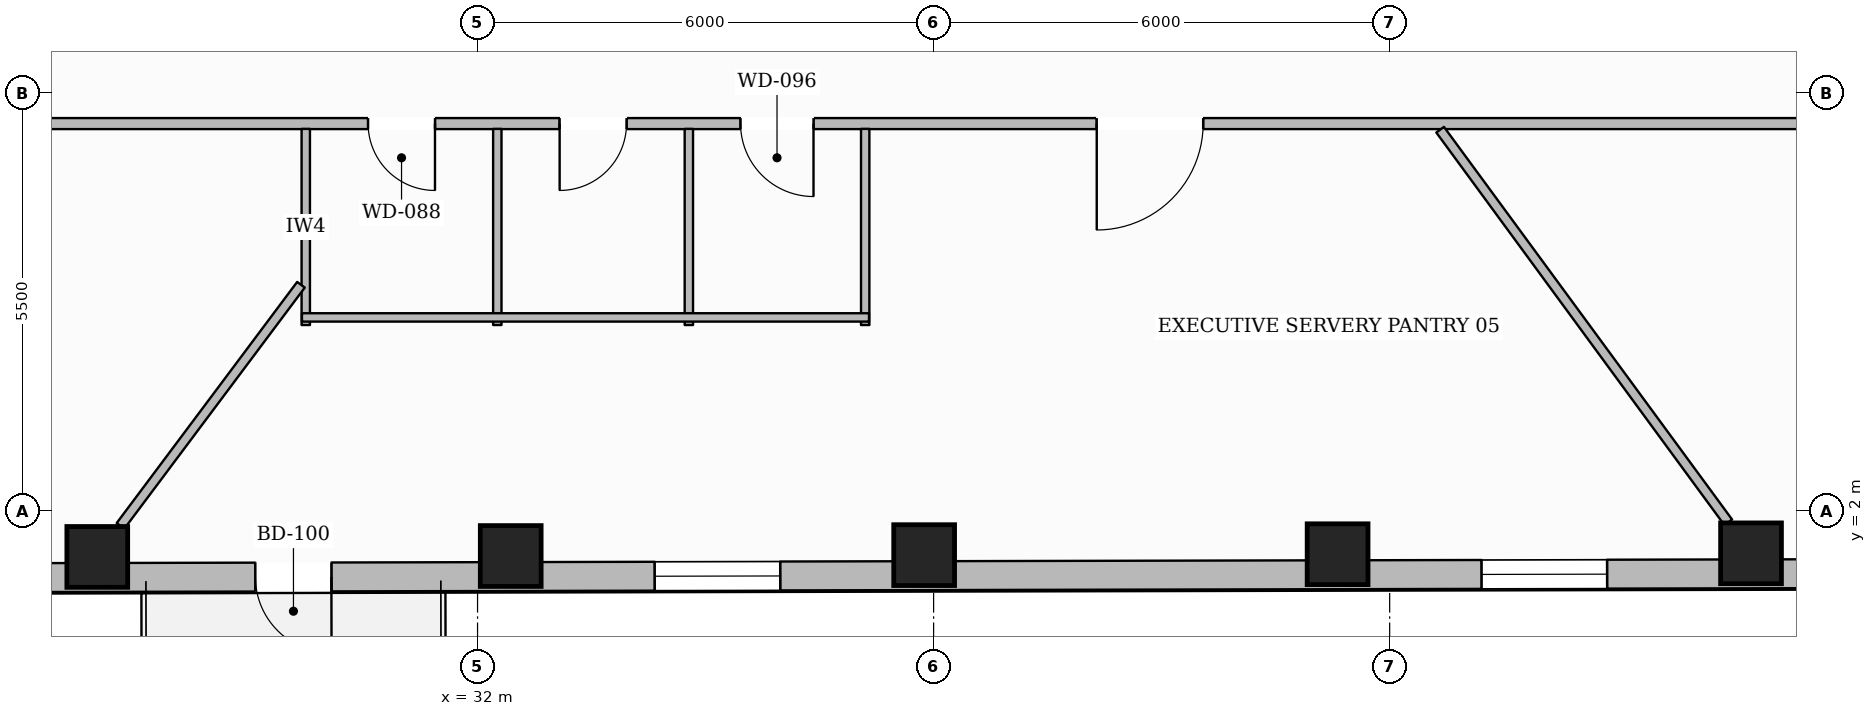
"""IFC4 building model, lengths in metres.
Left out: names, types, materials, properties, quantities, classifications, styles, units other than length and angle.
Written with IfcOpenShell. Run it as: python <this file> out.ifc"""

import sys

from ifc_helpers import new_model, si_unit, direction, frame, frame_2d, origin, origin_2d, place, context, subcontext, project, spatial, rectangle, hollow_rectangle, extrude, element, fill, save


model = new_model("IFC4")
c1 = context("Model", 3, precision=1e-05, world=origin(), true_north=direction((0.0, 1.0)))
c2 = subcontext(c1, "Body", "Model", "MODEL_VIEW")
j1 = project(units=[si_unit("LENGTHUNIT", "METRE"), si_unit("PLANEANGLEUNIT", "RADIAN")], contexts=[c1])
p1 = place(None, origin())
s1 = spatial("IfcSite", under=j1, at=p1, CompositionType="ELEMENT")
p2 = place(p1, origin())
s2 = spatial("IfcBuilding", under=s1, at=p2, CompositionType="ELEMENT")
p3 = place(p2, frame((0.0, 0.0, 17.55)))
s3 = spatial("IfcBuildingStorey", under=s2, at=p3, CompositionType="ELEMENT", Elevation=17.55)
for number, where, z_axis, x_axis in (
    (1, (26.997, 1.399, 0.0), (0.0, 0.0, 1.0), (1.0, 0.0, 0.0)),
    (2, (32.436, 1.411, 0.0), (0.0, 0.0, 1.0), (1.0, 0.0, 0.0)),
    (3, (37.875, 1.423, 0.0), (0.0, 0.0, 1.0), (1.0, 0.0, 0.0)),
    (4, (43.315, 1.435, 0.0), (0.0, 0.0, 1.0), (1.0, 0.0, 0.0)),
    (5, (48.754, 1.446, 0.0), (0.0, 0.0, 1.0), (1.0, 0.0, 0.0)),
):
    element("IfcColumn", number, at=place(p3, frame(where, z_axis=z_axis, x_axis=x_axis)), inside=s3, PredefinedType="COLUMN", context=c2, shape_type="SweptSolid", body=[
        extrude(hollow_rectangle(XDim=0.8, YDim=0.8, WallThickness=0.036, at=origin_2d()), origin(), (0.0, 0.0, 1.0), 3.59),
    ])
p4 = place(p3, frame((54.671, 1.189, 0.0), z_axis=(0.0, 0.0, 1.0), x_axis=(-0.999997638948, -0.002173038948, 0.0)))
e6 = element("IfcWall", 6, at=p4, inside=s3, PredefinedType="STANDARD", context=c2, shape_type="SweptSolid", body=[
    extrude(rectangle(XDim=33.593, YDim=0.38, at=frame_2d((16.796, 0.0))), origin(), (0.0, 0.0, 1.0), 2.97),
])
p5 = place(p4, frame((24.594, 0.0, 0.0)))
e7 = element("IfcOpeningElement", 7, at=p5, cuts=e6, PredefinedType="OPENING", context=c2, shape_type="SweptSolid", body=[
    extrude(rectangle(XDim=1.0, YDim=2.2, at=frame_2d((0.5, 1.1))), frame((0.0, 0.2, 0.0), z_axis=(0.0, -1.0, 0.0), x_axis=(1.0, 0.0, 0.0)), (0.0, 0.0, 1.0), 0.4),
])
p6 = place(p4, frame((29.569, 0.0, 0.65)))
e8 = element("IfcOpeningElement", 8, at=p6, cuts=e6, PredefinedType="OPENING", context=c2, shape_type="SweptSolid", body=[
    extrude(rectangle(XDim=1.65, YDim=1.75, at=frame_2d((0.825, 0.875))), frame((0.0, 0.2, 0.0), z_axis=(0.0, -1.0, 0.0), x_axis=(1.0, 0.0, 0.0)), (0.0, 0.0, 1.0), 0.4),
])
p7 = place(p4, frame((18.69, 0.0, 0.65)))
e9 = element("IfcOpeningElement", 9, at=p7, cuts=e6, PredefinedType="OPENING", context=c2, shape_type="SweptSolid", body=[
    extrude(rectangle(XDim=1.65, YDim=1.75, at=frame_2d((0.825, 0.875))), frame((0.0, 0.2, 0.0), z_axis=(0.0, -1.0, 0.0), x_axis=(1.0, 0.0, 0.0)), (0.0, 0.0, 1.0), 0.4),
])
p8 = place(p4, frame((7.811, 0.0, 0.65)))
e10 = element("IfcOpeningElement", 10, at=p8, cuts=e6, PredefinedType="OPENING", context=c2, shape_type="SweptSolid", body=[
    extrude(rectangle(XDim=1.65, YDim=1.75, at=frame_2d((0.825, 0.875))), frame((0.0, 0.2, 0.0), z_axis=(0.0, -1.0, 0.0), x_axis=(1.0, 0.0, 0.0)), (0.0, 0.0, 1.0), 0.4),
])
p9 = place(p4, frame((2.372, 0.0, 0.65)))
e11 = element("IfcOpeningElement", 11, at=p9, cuts=e6, PredefinedType="OPENING", context=c2, shape_type="SweptSolid", body=[
    extrude(rectangle(XDim=1.65, YDim=1.75, at=frame_2d((0.825, 0.875))), frame((0.0, 0.2, 0.0), z_axis=(0.0, -1.0, 0.0), x_axis=(1.0, 0.0, 0.0)), (0.0, 0.0, 1.0), 0.4),
])
p10 = place(p3, frame((49.92, 7.1, 0.0), z_axis=(0.0, 0.0, 1.0), x_axis=(-1.0, 0.0, 0.0)))
e12 = element("IfcWall", 12, at=p10, inside=s3, PredefinedType="PARTITIONING", context=c2, shape_type="SweptSolid", body=[
    extrude(rectangle(XDim=23.84, YDim=0.145, at=frame_2d((11.92, 0.0))), origin(), (0.0, 0.0, 1.0), 3.278),
])
p11 = place(p10, frame((18.48, 0.0, 0.0)))
e13 = element("IfcOpeningElement", 13, at=p11, cuts=e12, PredefinedType="OPENING", context=c2, shape_type="SweptSolid", body=[
    extrude(rectangle(XDim=0.88, YDim=2.1, at=frame_2d((0.44, 1.05))), frame((0.0, 0.083, 0.0), z_axis=(0.0, -1.0, 0.0), x_axis=(1.0, 0.0, 0.0)), (0.0, 0.0, 1.0), 0.165),
])
p12 = place(p10, frame((15.96, 0.0, 0.0)))
e14 = element("IfcOpeningElement", 14, at=p12, cuts=e12, PredefinedType="OPENING", context=c2, shape_type="SweptSolid", body=[
    extrude(rectangle(XDim=0.88, YDim=2.1, at=frame_2d((0.44, 1.05))), frame((0.0, 0.083, 0.0), z_axis=(0.0, -1.0, 0.0), x_axis=(1.0, 0.0, 0.0)), (0.0, 0.0, 1.0), 0.165),
])
p13 = place(p10, frame((13.5, 0.0, 0.0)))
e15 = element("IfcOpeningElement", 15, at=p13, cuts=e12, PredefinedType="OPENING", context=c2, shape_type="SweptSolid", body=[
    extrude(rectangle(XDim=0.96, YDim=2.1, at=frame_2d((0.48, 1.05))), frame((0.0, 0.083, 0.0), z_axis=(0.0, -1.0, 0.0), x_axis=(1.0, 0.0, 0.0)), (0.0, 0.0, 1.0), 0.165),
])
p14 = place(p10, frame((8.374, 0.0, 0.0)))
e16 = element("IfcOpeningElement", 16, at=p14, cuts=e12, PredefinedType="OPENING", context=c2, shape_type="SweptSolid", body=[
    extrude(rectangle(XDim=1.4, YDim=2.2, at=frame_2d((0.7, 1.1))), frame((0.0, 0.083, 0.0), z_axis=(0.0, -1.0, 0.0), x_axis=(1.0, 0.0, 0.0)), (0.0, 0.0, 1.0), 0.165),
])
p15 = place(p3, frame((29.74, 4.45, 0.0), z_axis=(0.0, 0.0, 1.0), x_axis=(0.0, 1.0, 0.0)))
e17 = element("IfcWall", 17, at=p15, inside=s3, PredefinedType="PLUMBINGWALL", context=c2, shape_type="SweptSolid", body=[
    extrude(rectangle(XDim=2.58, YDim=0.11, at=frame_2d((1.29, 0.0))), origin(), (0.0, 0.0, 1.0), 3.59),
])
p16 = place(p3, frame((32.26, 4.45, 0.0), z_axis=(0.0, 0.0, 1.0), x_axis=(0.0, 1.0, 0.0)))
e18 = element("IfcWall", 18, at=p16, inside=s3, PredefinedType="PLUMBINGWALL", context=c2, shape_type="SweptSolid", body=[
    extrude(rectangle(XDim=2.58, YDim=0.11, at=frame_2d((1.29, 0.0))), origin(), (0.0, 0.0, 1.0), 3.057),
])
for number, where, z_axis, x_axis in (
    (19, (34.78, 4.45, 0.0), (0.0, 0.0, 1.0), (0.0, 1.0, 0.0)),
    (20, (37.1, 4.45, 0.0), (0.0, 0.0, 1.0), (0.0, 1.0, 0.0)),
):
    element("IfcWall", number, at=place(p3, frame(where, z_axis=z_axis, x_axis=x_axis)), inside=s3, PredefinedType="PLUMBINGWALL", context=c2, shape_type="SweptSolid", body=[
        extrude(rectangle(XDim=2.58, YDim=0.11, at=frame_2d((1.29, 0.0))), origin(), (0.0, 0.0, 1.0), 3.59),
    ])
p17 = place(p3, frame((29.69, 4.55, 0.0), z_axis=(0.0, 0.0, 1.0), x_axis=(1.0, 0.0, 0.0)))
e21 = element("IfcWall", 21, at=p17, inside=s3, PredefinedType="PLUMBINGWALL", context=c2, shape_type="SweptSolid", body=[
    extrude(rectangle(XDim=7.46, YDim=0.11, at=frame_2d((3.73, 0.0))), origin(), (0.0, 0.0, 1.0), 3.59),
])
p18 = place(p3, frame((29.677, 4.979, 0.0), z_axis=(0.0, 0.0, 1.0), x_axis=(-0.599201259021, -0.800598433166, 0.0)))
e22 = element("IfcWall", 22, at=p18, inside=s3, PredefinedType="PARTITIONING", context=c2, shape_type="SweptSolid", body=[
    extrude(rectangle(XDim=3.963, YDim=0.125, at=frame_2d((1.981, 0.0))), origin(), (0.0, 0.0, 1.0), 3.59),
])
p19 = place(p3, frame((44.664, 7.02, 0.0), z_axis=(0.0, 0.0, 1.0), x_axis=(0.591651081468, -0.806194143986, 0.0)))
e23 = element("IfcWall", 23, at=p19, inside=s3, PredefinedType="PARTITIONING", context=c2, shape_type="SweptSolid", body=[
    extrude(rectangle(XDim=6.407, YDim=0.125, at=frame_2d((3.203, 0.0))), origin(), (0.0, 0.0, 1.0), 3.59),
])
p20 = place(p5, origin())
e24 = element("IfcDoor", 24, at=p20, inside=s3, OperationType="SINGLE_SWING_LEFT", PredefinedType="DOOR", context=c2, shape_type="SweptSolid", body=[
    extrude(rectangle(XDim=1.0, YDim=2.2, at=frame_2d((0.5, 1.1))), frame((0.0, 0.025, 0.0), z_axis=(0.0, -1.0, 0.0), x_axis=(1.0, 0.0, 0.0)), (0.0, 0.0, 1.0), 0.05),
])
fill(e7, e24)
p21 = place(p7, origin())
e25 = element("IfcWindow", 25, at=p21, inside=s3, PartitioningType="SINGLE_PANEL", PredefinedType="WINDOW", context=c2, shape_type="SweptSolid", body=[
    extrude(rectangle(XDim=1.65, YDim=1.75, at=frame_2d((0.825, 0.875))), frame((0.0, 0.03, 0.0), z_axis=(0.0, -1.0, 0.0), x_axis=(1.0, 0.0, 0.0)), (0.0, 0.0, 1.0), 0.06),
])
fill(e9, e25)
p22 = place(p8, origin())
e26 = element("IfcWindow", 26, at=p22, inside=s3, PartitioningType="SINGLE_PANEL", PredefinedType="WINDOW", context=c2, shape_type="SweptSolid", body=[
    extrude(rectangle(XDim=1.65, YDim=1.75, at=frame_2d((0.825, 0.875))), frame((0.0, 0.03, 0.0), z_axis=(0.0, -1.0, 0.0), x_axis=(1.0, 0.0, 0.0)), (0.0, 0.0, 1.0), 0.06),
])
fill(e10, e26)
p23 = place(p11, origin())
e27 = element("IfcDoor", 27, at=p23, inside=s3, OperationType="SINGLE_SWING_LEFT", PredefinedType="DOOR", context=c2, shape_type="SweptSolid", body=[
    extrude(rectangle(XDim=0.88, YDim=2.1, at=frame_2d((0.44, 1.05))), frame((0.0, 0.025, 0.0), z_axis=(0.0, -1.0, 0.0), x_axis=(1.0, 0.0, 0.0)), (0.0, 0.0, 1.0), 0.05),
])
fill(e13, e27)
p24 = place(p12, origin())
e28 = element("IfcDoor", 28, at=p24, inside=s3, OperationType="SINGLE_SWING_RIGHT", PredefinedType="DOOR", context=c2, shape_type="SweptSolid", body=[
    extrude(rectangle(XDim=0.88, YDim=2.1, at=frame_2d((0.44, 1.05))), frame((0.0, 0.025, 0.0), z_axis=(0.0, -1.0, 0.0), x_axis=(1.0, 0.0, 0.0)), (0.0, 0.0, 1.0), 0.05),
])
fill(e14, e28)
p25 = place(p13, origin())
e29 = element("IfcDoor", 29, at=p25, inside=s3, OperationType="SINGLE_SWING_LEFT", PredefinedType="DOOR", context=c2, shape_type="SweptSolid", body=[
    extrude(rectangle(XDim=0.96, YDim=2.1, at=frame_2d((0.48, 1.05))), frame((0.0, 0.025, 0.0), z_axis=(0.0, -1.0, 0.0), x_axis=(1.0, 0.0, 0.0)), (0.0, 0.0, 1.0), 0.05),
])
fill(e15, e29)
p26 = place(p14, origin())
e30 = element("IfcDoor", 30, at=p26, inside=s3, OperationType="SINGLE_SWING_RIGHT", PredefinedType="DOOR", context=c2, shape_type="SweptSolid", body=[
    extrude(rectangle(XDim=1.4, YDim=2.2, at=frame_2d((0.7, 1.1))), frame((0.0, 0.025, 0.0), z_axis=(0.0, -1.0, 0.0), x_axis=(1.0, 0.0, 0.0)), (0.0, 0.0, 1.0), 0.05),
])
fill(e16, e30)
save(model, sys.argv[1])
